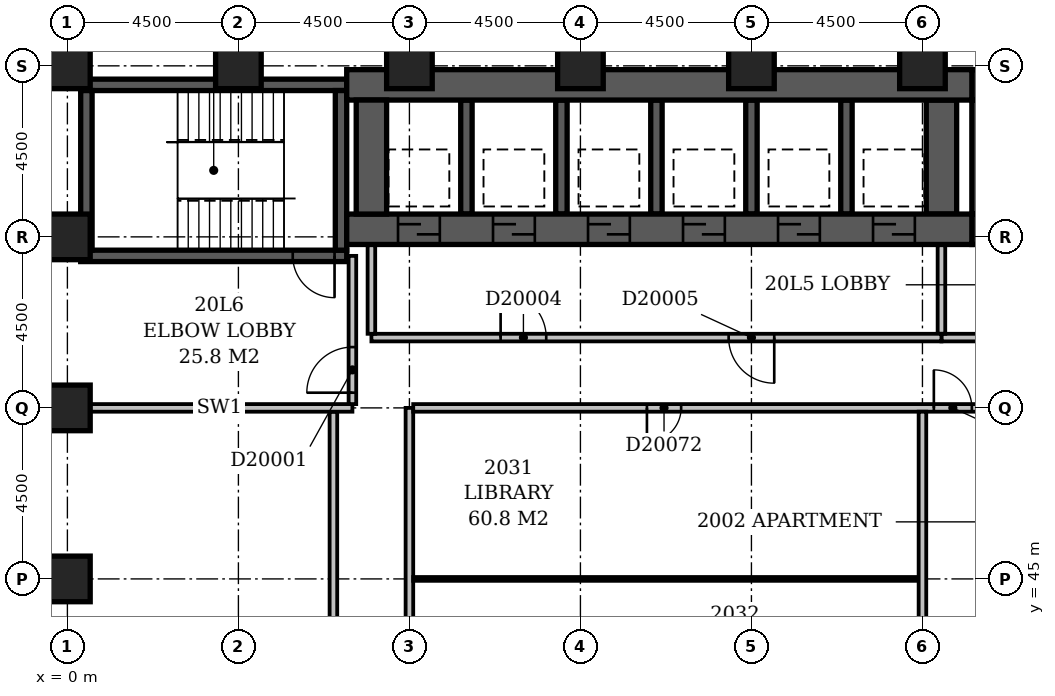
"""IFC4 building model, lengths in metres.
Left out: names, types, materials, properties, quantities, classifications, styles, units other than length and angle.
Written with IfcOpenShell. Run it as: python <this file> out.ifc"""

import sys

from ifc_helpers import new_model, si_unit, direction, frame, frame_2d, origin, origin_2d, place, context, subcontext, project, spatial, rectangle, extrude, element, fill, save


model = new_model("IFC4")
c1 = context("Model", 3, precision=1e-05, world=origin(), true_north=direction((0.0, 1.0)))
c2 = subcontext(c1, "Body", "Model", "MODEL_VIEW")
j1 = project(units=[si_unit("LENGTHUNIT", "METRE"), si_unit("PLANEANGLEUNIT", "RADIAN")], contexts=[c1])
p1 = place(None, origin())
s1 = spatial("IfcSite", under=j1, at=p1, CompositionType="ELEMENT")
p2 = place(p1, origin())
s2 = spatial("IfcBuilding", under=s1, at=p2, CompositionType="ELEMENT")
p3 = place(p2, frame((0.0, 0.0, 83.0)))
s3 = spatial("IfcBuildingStorey", under=s2, at=p3, CompositionType="ELEMENT", Elevation=83.0)
p4 = place(p3, frame((0.35, 53.5, -0.3), z_axis=(0.0, 0.0, 1.0), x_axis=(1.0, 0.0, 0.0)))
e1 = element("IfcWall", 1, at=p4, inside=s3, PredefinedType="SHEAR", context=c2, shape_type="SweptSolid", body=[
    extrude(rectangle(XDim=7.0, YDim=0.3, at=frame_2d((3.5, 0.0))), origin(), (0.0, 0.0, 1.0), 3.6),
])
p5 = place(p4, frame((5.58, 0.0, 0.3)))
e2 = element("IfcOpeningElement", 2, at=p5, cuts=e1, PredefinedType="OPENING", context=c2, shape_type="SweptSolid", body=[
    extrude(rectangle(XDim=1.1, YDim=2.1, at=frame_2d((0.55, 1.05))), frame((0.0, 0.162, 0.0), z_axis=(0.0, -1.0, 0.0), x_axis=(1.0, 0.0, 0.0)), (0.0, 0.0, 1.0), 0.324),
])
p6 = place(p3, frame((0.35, 58.0, -0.3), z_axis=(0.0, 0.0, 1.0), x_axis=(1.0, 0.0, 0.0)))
e3 = element("IfcWall", 3, at=p6, inside=s3, PredefinedType="SHEAR", context=c2, shape_type="SweptSolid", body=[
    extrude(rectangle(XDim=7.0, YDim=0.3, at=frame_2d((3.5, 0.0))), origin(), (0.0, 0.0, 1.0), 3.6),
])
for number, where, z_axis, x_axis in (
    (4, (0.5, 53.65, -0.3), (0.0, 0.0, 1.0), (0.0, 1.0, 0.0)),
    (5, (7.2, 53.65, -0.3), (0.0, 0.0, 1.0), (0.0, 1.0, 0.0)),
):
    element("IfcWall", number, at=place(p3, frame(where, z_axis=z_axis, x_axis=x_axis)), inside=s3, PredefinedType="SHEAR", context=c2, shape_type="SweptSolid", body=[
        extrude(rectangle(XDim=4.2, YDim=0.3, at=frame_2d((2.1, 0.0))), origin(), (0.0, 0.0, 1.0), 3.6),
    ])
p7 = place(p3, frame((7.35, 54.2, -0.3), z_axis=(0.0, 0.0, 1.0), x_axis=(1.0, 0.0, 0.0)))
e6 = element("IfcWall", 6, at=p7, inside=s3, PredefinedType="SHEAR", context=c2, shape_type="SweptSolid", body=[
    extrude(rectangle(XDim=16.45, YDim=0.8, at=frame_2d((8.225, 0.0))), origin(), (0.0, 0.0, 1.0), 3.6),
])
p8 = place(p7, frame((1.35, 0.0, 0.3)))
e7 = element("IfcOpeningElement", 7, at=p8, cuts=e6, PredefinedType="OPENING", context=c2, shape_type="SweptSolid", body=[
    extrude(rectangle(XDim=1.1, YDim=2.1, at=frame_2d((0.55, 1.05))), frame((0.0, 0.412, 0.0), z_axis=(0.0, -1.0, 0.0), x_axis=(1.0, 0.0, 0.0)), (0.0, 0.0, 1.0), 0.824),
])
p9 = place(p7, frame((3.85, 0.0, 0.3)))
e8 = element("IfcOpeningElement", 8, at=p9, cuts=e6, PredefinedType="OPENING", context=c2, shape_type="SweptSolid", body=[
    extrude(rectangle(XDim=1.1, YDim=2.1, at=frame_2d((0.55, 1.05))), frame((0.0, 0.412, 0.0), z_axis=(0.0, -1.0, 0.0), x_axis=(1.0, 0.0, 0.0)), (0.0, 0.0, 1.0), 0.824),
])
p10 = place(p7, frame((6.35, 0.0, 0.3)))
e9 = element("IfcOpeningElement", 9, at=p10, cuts=e6, PredefinedType="OPENING", context=c2, shape_type="SweptSolid", body=[
    extrude(rectangle(XDim=1.1, YDim=2.1, at=frame_2d((0.55, 1.05))), frame((0.0, 0.412, 0.0), z_axis=(0.0, -1.0, 0.0), x_axis=(1.0, 0.0, 0.0)), (0.0, 0.0, 1.0), 0.824),
])
p11 = place(p7, frame((8.85, 0.0, 0.3)))
e10 = element("IfcOpeningElement", 10, at=p11, cuts=e6, PredefinedType="OPENING", context=c2, shape_type="SweptSolid", body=[
    extrude(rectangle(XDim=1.1, YDim=2.1, at=frame_2d((0.55, 1.05))), frame((0.0, 0.412, 0.0), z_axis=(0.0, -1.0, 0.0), x_axis=(1.0, 0.0, 0.0)), (0.0, 0.0, 1.0), 0.824),
])
p12 = place(p7, frame((11.35, 0.0, 0.3)))
e11 = element("IfcOpeningElement", 11, at=p12, cuts=e6, PredefinedType="OPENING", context=c2, shape_type="SweptSolid", body=[
    extrude(rectangle(XDim=1.1, YDim=2.1, at=frame_2d((0.55, 1.05))), frame((0.0, 0.412, 0.0), z_axis=(0.0, -1.0, 0.0), x_axis=(1.0, 0.0, 0.0)), (0.0, 0.0, 1.0), 0.824),
])
p13 = place(p7, frame((13.85, 0.0, 0.3)))
e12 = element("IfcOpeningElement", 12, at=p13, cuts=e6, PredefinedType="OPENING", context=c2, shape_type="SweptSolid", body=[
    extrude(rectangle(XDim=1.1, YDim=2.1, at=frame_2d((0.55, 1.05))), frame((0.0, 0.412, 0.0), z_axis=(0.0, -1.0, 0.0), x_axis=(1.0, 0.0, 0.0)), (0.0, 0.0, 1.0), 0.824),
])
p14 = place(p3, frame((7.35, 58.0, -0.3), z_axis=(0.0, 0.0, 1.0), x_axis=(1.0, 0.0, 0.0)))
e13 = element("IfcWall", 13, at=p14, inside=s3, PredefinedType="SHEAR", context=c2, shape_type="SweptSolid", body=[
    extrude(rectangle(XDim=16.45, YDim=0.8, at=frame_2d((8.225, 0.0))), origin(), (0.0, 0.0, 1.0), 3.6),
])
p15 = place(p3, frame((8.0, 54.6, -0.3), z_axis=(0.0, 0.0, 1.0), x_axis=(0.0, 1.0, 0.0)))
e14 = element("IfcWall", 14, at=p15, inside=s3, PredefinedType="SHEAR", context=c2, shape_type="SweptSolid", body=[
    extrude(rectangle(XDim=3.0, YDim=0.8, at=frame_2d((1.5, 0.0))), origin(), (0.0, 0.0, 1.0), 3.6),
])
for number, where, z_axis, x_axis in (
    (15, (10.5, 54.6, -0.3), (0.0, 0.0, 1.0), (0.0, 1.0, 0.0)),
    (16, (13.0, 54.6, -0.3), (0.0, 0.0, 1.0), (0.0, 1.0, 0.0)),
    (17, (15.5, 54.6, -0.3), (0.0, 0.0, 1.0), (0.0, 1.0, 0.0)),
    (18, (18.0, 54.6, -0.3), (0.0, 0.0, 1.0), (0.0, 1.0, 0.0)),
    (19, (20.5, 54.6, -0.3), (0.0, 0.0, 1.0), (0.0, 1.0, 0.0)),
):
    element("IfcWall", number, at=place(p3, frame(where, z_axis=z_axis, x_axis=x_axis)), inside=s3, PredefinedType="SHEAR", context=c2, shape_type="SweptSolid", body=[
        extrude(rectangle(XDim=3.0, YDim=0.3, at=frame_2d((1.5, 0.0))), origin(), (0.0, 0.0, 1.0), 3.6),
    ])
p16 = place(p3, frame((23.0, 54.6, -0.3), z_axis=(0.0, 0.0, 1.0), x_axis=(0.0, 1.0, 0.0)))
e20 = element("IfcWall", 20, at=p16, inside=s3, PredefinedType="SHEAR", context=c2, shape_type="SweptSolid", body=[
    extrude(rectangle(XDim=3.0, YDim=0.8, at=frame_2d((1.5, 0.0))), origin(), (0.0, 0.0, 1.0), 3.6),
])
p17 = place(p3, frame((23.8, 54.2, -0.3), z_axis=(0.0, 0.0, 1.0), x_axis=(1.0, 0.0, 0.0)))
e21 = element("IfcWall", 21, at=p17, inside=s3, PredefinedType="SHEAR", context=c2, shape_type="SweptSolid", body=[
    extrude(rectangle(XDim=3.3, YDim=0.8, at=frame_2d((1.65, 0.0))), origin(), (0.0, 0.0, 1.0), 3.6),
])
p18 = place(p17, frame((1.1, 0.0, 0.3)))
e22 = element("IfcOpeningElement", 22, at=p18, cuts=e21, PredefinedType="OPENING", context=c2, shape_type="SweptSolid", body=[
    extrude(rectangle(XDim=1.1, YDim=2.1, at=frame_2d((0.55, 1.05))), frame((0.0, 0.412, 0.0), z_axis=(0.0, -1.0, 0.0), x_axis=(1.0, 0.0, 0.0)), (0.0, 0.0, 1.0), 0.824),
])
p19 = place(p3, frame((23.8, 58.0, -0.3), z_axis=(0.0, 0.0, 1.0), x_axis=(1.0, 0.0, 0.0)))
e23 = element("IfcWall", 23, at=p19, inside=s3, PredefinedType="SHEAR", context=c2, shape_type="SweptSolid", body=[
    extrude(rectangle(XDim=3.3, YDim=0.8, at=frame_2d((1.65, 0.0))), origin(), (0.0, 0.0, 1.0), 3.6),
])
p20 = place(p3, frame((24.2, 54.6, -0.3), z_axis=(0.0, 0.0, 1.0), x_axis=(0.0, 1.0, 0.0)))
e24 = element("IfcWall", 24, at=p20, inside=s3, PredefinedType="SHEAR", context=c2, shape_type="SweptSolid", body=[
    extrude(rectangle(XDim=3.0, YDim=0.8, at=frame_2d((1.5, 0.0))), origin(), (0.0, 0.0, 1.0), 3.6),
])
for number, where, z_axis, x_axis in (
    (25, (0.0, 45.0, -0.3), (0.0, 0.0, 1.0), (1.0, 0.0, 0.0)),
    (26, (0.0, 49.5, -0.3), (0.0, 0.0, 1.0), (1.0, 0.0, 0.0)),
    (27, (0.0, 54.0, -0.3), (0.0, 0.0, 1.0), (1.0, 0.0, 0.0)),
    (28, (0.0, 58.5, -0.3), (0.0, 0.0, 1.0), (1.0, 0.0, 0.0)),
    (29, (4.5, 58.5, -0.3), (0.0, 0.0, 1.0), (1.0, 0.0, 0.0)),
    (30, (9.0, 58.5, -0.3), (0.0, 0.0, 1.0), (1.0, 0.0, 0.0)),
    (31, (13.5, 58.5, -0.3), (0.0, 0.0, 1.0), (1.0, 0.0, 0.0)),
    (32, (18.0, 58.5, -0.3), (0.0, 0.0, 1.0), (1.0, 0.0, 0.0)),
    (33, (22.5, 58.5, -0.3), (0.0, 0.0, 1.0), (1.0, 0.0, 0.0)),
):
    element("IfcColumn", number, at=place(p3, frame(where, z_axis=z_axis, x_axis=x_axis)), inside=s3, PredefinedType="COLUMN", context=c2, shape_type="SweptSolid", body=[
        extrude(rectangle(XDim=1.2, YDim=1.2, at=origin_2d()), origin(), (0.0, 0.0, 1.0), 3.6),
    ])
p21 = place(p3, frame((8.0, 51.35, 0.0), z_axis=(0.0, 0.0, 1.0), x_axis=(1.0, 0.0, 0.0)))
e34 = element("IfcWall", 34, at=p21, inside=s3, PredefinedType="PARTITIONING", context=c2, shape_type="SweptSolid", body=[
    extrude(rectangle(XDim=15.0, YDim=0.2, at=frame_2d((7.5, 0.0))), origin(), (0.0, 0.0, 1.0), 3.3),
])
p22 = place(p21, frame((3.4, 0.0, 0.0)))
e35 = element("IfcOpeningElement", 35, at=p22, cuts=e34, PredefinedType="OPENING", context=c2, shape_type="SweptSolid", body=[
    extrude(rectangle(XDim=1.2, YDim=2.1, at=frame_2d((0.6, 1.05))), frame((0.0, 0.112, 0.0), z_axis=(0.0, -1.0, 0.0), x_axis=(1.0, 0.0, 0.0)), (0.0, 0.0, 1.0), 0.224),
])
p23 = place(p21, frame((9.4, 0.0, 0.0)))
e36 = element("IfcOpeningElement", 36, at=p23, cuts=e34, PredefinedType="OPENING", context=c2, shape_type="SweptSolid", body=[
    extrude(rectangle(XDim=1.2, YDim=2.1, at=frame_2d((0.6, 1.05))), frame((0.0, 0.112, 0.0), z_axis=(0.0, -1.0, 0.0), x_axis=(1.0, 0.0, 0.0)), (0.0, 0.0, 1.0), 0.224),
])
for number, where, z_axis, x_axis in (
    (37, (23.0, 51.45, 0.0), (0.0, 0.0, 1.0), (0.0, 1.0, 0.0)),
    (38, (8.0, 51.45, 0.0), (0.0, 0.0, 1.0), (0.0, 1.0, 0.0)),
):
    element("IfcWall", number, at=place(p3, frame(where, z_axis=z_axis, x_axis=x_axis)), inside=s3, PredefinedType="PARTITIONING", context=c2, shape_type="SweptSolid", body=[
        extrude(rectangle(XDim=2.33, YDim=0.2, at=frame_2d((1.165, 0.0))), origin(), (0.0, 0.0, 1.0), 3.3),
    ])
p24 = place(p3, frame((23.0, 51.35, 0.0), z_axis=(0.0, 0.0, 1.0), x_axis=(1.0, 0.0, 0.0)))
e39 = element("IfcWall", 39, at=p24, inside=s3, PredefinedType="PARTITIONING", context=c2, shape_type="SweptSolid", body=[
    extrude(rectangle(XDim=4.8, YDim=0.2, at=frame_2d((2.4, 0.0))), origin(), (0.0, 0.0, 1.0), 3.3),
])
p25 = place(p24, frame((1.65, 0.0, 0.0)))
e40 = element("IfcOpeningElement", 40, at=p25, cuts=e39, PredefinedType="OPENING", context=c2, shape_type="SweptSolid", body=[
    extrude(rectangle(XDim=1.2, YDim=2.1, at=frame_2d((0.6, 1.05))), frame((0.0, 0.112, 0.0), z_axis=(0.0, -1.0, 0.0), x_axis=(1.0, 0.0, 0.0)), (0.0, 0.0, 1.0), 0.224),
])
p26 = place(p3, frame((0.5, 49.5, 0.0), z_axis=(0.0, 0.0, 1.0), x_axis=(1.0, 0.0, 0.0)))
e41 = element("IfcWall", 41, at=p26, inside=s3, PredefinedType="PARTITIONING", context=c2, shape_type="SweptSolid", body=[
    extrude(rectangle(XDim=7.0, YDim=0.2, at=frame_2d((3.5, 0.0))), origin(), (0.0, 0.0, 1.0), 3.3),
])
p27 = place(p3, frame((7.5, 49.6, 0.0), z_axis=(0.0, 0.0, 1.0), x_axis=(0.0, 1.0, 0.0)))
e42 = element("IfcWall", 42, at=p27, inside=s3, PredefinedType="PARTITIONING", context=c2, shape_type="SweptSolid", body=[
    extrude(rectangle(XDim=3.9, YDim=0.2, at=frame_2d((1.95, 0.0))), origin(), (0.0, 0.0, 1.0), 3.3),
])
p28 = place(p27, frame((0.3, 0.0, 0.0)))
e43 = element("IfcOpeningElement", 43, at=p28, cuts=e42, PredefinedType="OPENING", context=c2, shape_type="SweptSolid", body=[
    extrude(rectangle(XDim=1.2, YDim=2.1, at=frame_2d((0.6, 1.05))), frame((0.0, 0.112, 0.0), z_axis=(0.0, -1.0, 0.0), x_axis=(1.0, 0.0, 0.0)), (0.0, 0.0, 1.0), 0.224),
])
p29 = place(p3, frame((9.0, 5.0, 0.0), z_axis=(0.0, 0.0, 1.0), x_axis=(0.0, 1.0, 0.0)))
e44 = element("IfcWall", 44, at=p29, inside=s3, PredefinedType="PARTITIONING", context=c2, shape_type="SweptSolid", body=[
    extrude(rectangle(XDim=44.5, YDim=0.2, at=frame_2d((22.25, 0.0))), origin(), (0.0, 0.0, 1.0), 3.3),
])
p30 = place(p29, frame((28.45, 0.0, 0.0)))
e45 = element("IfcOpeningElement", 45, at=p30, cuts=e44, PredefinedType="OPENING", context=c2, shape_type="SweptSolid", body=[
    extrude(rectangle(XDim=1.0, YDim=2.1, at=frame_2d((0.5, 1.05))), frame((0.0, 0.112, 0.0), z_axis=(0.0, -1.0, 0.0), x_axis=(1.0, 0.0, 0.0)), (0.0, 0.0, 1.0), 0.224),
])
p31 = place(p29, frame((22.8, 0.0, 0.0)))
e46 = element("IfcOpeningElement", 46, at=p31, cuts=e44, PredefinedType="OPENING", context=c2, shape_type="SweptSolid", body=[
    extrude(rectangle(XDim=1.0, YDim=2.1, at=frame_2d((0.5, 1.05))), frame((0.0, 0.112, 0.0), z_axis=(0.0, -1.0, 0.0), x_axis=(1.0, 0.0, 0.0)), (0.0, 0.0, 1.0), 0.224),
])
p32 = place(p29, frame((14.55, 0.0, 0.0)))
e47 = element("IfcOpeningElement", 47, at=p32, cuts=e44, PredefinedType="OPENING", context=c2, shape_type="SweptSolid", body=[
    extrude(rectangle(XDim=1.0, YDim=2.1, at=frame_2d((0.5, 1.05))), frame((0.0, 0.112, 0.0), z_axis=(0.0, -1.0, 0.0), x_axis=(1.0, 0.0, 0.0)), (0.0, 0.0, 1.0), 0.224),
])
p33 = place(p29, frame((9.3, 0.0, 0.0)))
e48 = element("IfcOpeningElement", 48, at=p33, cuts=e44, PredefinedType="OPENING", context=c2, shape_type="SweptSolid", body=[
    extrude(rectangle(XDim=1.0, YDim=2.1, at=frame_2d((0.5, 1.05))), frame((0.0, 0.112, 0.0), z_axis=(0.0, -1.0, 0.0), x_axis=(1.0, 0.0, 0.0)), (0.0, 0.0, 1.0), 0.224),
])
p34 = place(p29, frame((35.0, 0.0, 0.0)))
e49 = element("IfcOpeningElement", 49, at=p34, cuts=e44, PredefinedType="OPENING", context=c2, shape_type="SweptSolid", body=[
    extrude(rectangle(XDim=0.9, YDim=2.1, at=frame_2d((0.45, 1.05))), frame((0.0, 0.112, 0.0), z_axis=(0.0, -1.0, 0.0), x_axis=(1.0, 0.0, 0.0)), (0.0, 0.0, 1.0), 0.224),
])
p35 = place(p29, frame((1.5, 0.0, 0.0)))
e50 = element("IfcOpeningElement", 50, at=p35, cuts=e44, PredefinedType="OPENING", context=c2, shape_type="SweptSolid", body=[
    extrude(rectangle(XDim=0.9, YDim=2.1, at=frame_2d((0.45, 1.05))), frame((0.0, 0.112, 0.0), z_axis=(0.0, -1.0, 0.0), x_axis=(1.0, 0.0, 0.0)), (0.0, 0.0, 1.0), 0.224),
])
p36 = place(p3, frame((7.0, 34.6, 0.0), z_axis=(0.0, 0.0, 1.0), x_axis=(0.0, 1.0, 0.0)))
e51 = element("IfcWall", 51, at=p36, inside=s3, PredefinedType="PARTITIONING", context=c2, shape_type="SweptSolid", body=[
    extrude(rectangle(XDim=14.8, YDim=0.2, at=frame_2d((7.4, 0.0))), origin(), (0.0, 0.0, 1.0), 3.3),
])
p37 = place(p36, frame((6.95, 0.0, 0.0)))
e52 = element("IfcOpeningElement", 52, at=p37, cuts=e51, PredefinedType="OPENING", context=c2, shape_type="SweptSolid", body=[
    extrude(rectangle(XDim=0.9, YDim=2.1, at=frame_2d((0.45, 1.05))), frame((0.0, 0.112, 0.0), z_axis=(0.0, -1.0, 0.0), x_axis=(1.0, 0.0, 0.0)), (0.0, 0.0, 1.0), 0.224),
])
p38 = place(p3, frame((22.5, 36.6, 0.0), z_axis=(0.0, 0.0, 1.0), x_axis=(0.0, 1.0, 0.0)))
e53 = element("IfcWall", 53, at=p38, inside=s3, PredefinedType="PARTITIONING", context=c2, shape_type="SweptSolid", body=[
    extrude(rectangle(XDim=12.8, YDim=0.2, at=frame_2d((6.4, 0.0))), origin(), (0.0, 0.0, 1.0), 3.3),
])
p39 = place(p3, frame((9.1, 45.0, 0.0), z_axis=(0.0, 0.0, 1.0), x_axis=(1.0, 0.0, 0.0)))
e54 = element("IfcWall", 54, at=p39, inside=s3, PredefinedType="PARTITIONING", context=c2, shape_type="SweptSolid", body=[
    extrude(rectangle(XDim=13.3, YDim=0.1, at=frame_2d((6.65, 0.0))), origin(), (0.0, 0.0, 1.0), 3.3),
])
p40 = place(p3, frame((9.1, 49.5, 0.0), z_axis=(0.0, 0.0, 1.0), x_axis=(1.0, 0.0, 0.0)))
e55 = element("IfcWall", 55, at=p40, inside=s3, PredefinedType="PARTITIONING", context=c2, shape_type="SweptSolid", body=[
    extrude(rectangle(XDim=57.8, YDim=0.2, at=frame_2d((28.9, 0.0))), origin(), (0.0, 0.0, 1.0), 3.3),
])
p41 = place(p40, frame((13.7, 0.0, 0.0)))
e56 = element("IfcOpeningElement", 56, at=p41, cuts=e55, PredefinedType="OPENING", context=c2, shape_type="SweptSolid", body=[
    extrude(rectangle(XDim=1.0, YDim=2.1, at=frame_2d((0.5, 1.05))), frame((0.0, 0.112, 0.0), z_axis=(0.0, -1.0, 0.0), x_axis=(1.0, 0.0, 0.0)), (0.0, 0.0, 1.0), 0.224),
])
p42 = place(p40, frame((22.7, 0.0, 0.0)))
e57 = element("IfcOpeningElement", 57, at=p42, cuts=e55, PredefinedType="OPENING", context=c2, shape_type="SweptSolid", body=[
    extrude(rectangle(XDim=1.0, YDim=2.1, at=frame_2d((0.5, 1.05))), frame((0.0, 0.112, 0.0), z_axis=(0.0, -1.0, 0.0), x_axis=(1.0, 0.0, 0.0)), (0.0, 0.0, 1.0), 0.224),
])
p43 = place(p40, frame((38.6, 0.0, 0.0)))
e58 = element("IfcOpeningElement", 58, at=p43, cuts=e55, PredefinedType="OPENING", context=c2, shape_type="SweptSolid", body=[
    extrude(rectangle(XDim=1.0, YDim=2.1, at=frame_2d((0.5, 1.05))), frame((0.0, 0.112, 0.0), z_axis=(0.0, -1.0, 0.0), x_axis=(1.0, 0.0, 0.0)), (0.0, 0.0, 1.0), 0.224),
])
p44 = place(p40, frame((55.45, 0.0, 0.0)))
e59 = element("IfcOpeningElement", 59, at=p44, cuts=e55, PredefinedType="OPENING", context=c2, shape_type="SweptSolid", body=[
    extrude(rectangle(XDim=1.0, YDim=2.1, at=frame_2d((0.5, 1.05))), frame((0.0, 0.112, 0.0), z_axis=(0.0, -1.0, 0.0), x_axis=(1.0, 0.0, 0.0)), (0.0, 0.0, 1.0), 0.224),
])
p45 = place(p40, frame((6.15, 0.0, 0.0)))
e60 = element("IfcOpeningElement", 60, at=p45, cuts=e55, PredefinedType="OPENING", context=c2, shape_type="SweptSolid", body=[
    extrude(rectangle(XDim=0.9, YDim=2.1, at=frame_2d((0.45, 1.05))), frame((0.0, 0.112, 0.0), z_axis=(0.0, -1.0, 0.0), x_axis=(1.0, 0.0, 0.0)), (0.0, 0.0, 1.0), 0.224),
])
p46 = place(p28, origin())
e61 = element("IfcDoor", 61, at=p46, inside=s3, OperationType="SINGLE_SWING_LEFT", PredefinedType="DOOR", context=c2, shape_type="SweptSolid", body=[
    extrude(rectangle(XDim=1.2, YDim=2.1, at=frame_2d((0.6, 1.05))), frame((0.0, 0.025, 0.0), z_axis=(0.0, -1.0, 0.0), x_axis=(1.0, 0.0, 0.0)), (0.0, 0.0, 1.0), 0.05),
])
fill(e43, e61)
p47 = place(p8, origin())
e62 = element("IfcDoor", 62, at=p47, inside=s3, OperationType="SLIDING_TO_LEFT", PredefinedType="DOOR", context=c2, shape_type="SweptSolid", body=[
    extrude(rectangle(XDim=1.1, YDim=2.1, at=frame_2d((0.55, 1.05))), frame((0.0, 0.025, 0.0), z_axis=(0.0, -1.0, 0.0), x_axis=(1.0, 0.0, 0.0)), (0.0, 0.0, 1.0), 0.05),
])
fill(e7, e62)
p48 = place(p9, origin())
e63 = element("IfcDoor", 63, at=p48, inside=s3, OperationType="SLIDING_TO_LEFT", PredefinedType="DOOR", context=c2, shape_type="SweptSolid", body=[
    extrude(rectangle(XDim=1.1, YDim=2.1, at=frame_2d((0.55, 1.05))), frame((0.0, 0.025, 0.0), z_axis=(0.0, -1.0, 0.0), x_axis=(1.0, 0.0, 0.0)), (0.0, 0.0, 1.0), 0.05),
])
fill(e8, e63)
p49 = place(p10, origin())
e64 = element("IfcDoor", 64, at=p49, inside=s3, OperationType="SLIDING_TO_LEFT", PredefinedType="DOOR", context=c2, shape_type="SweptSolid", body=[
    extrude(rectangle(XDim=1.1, YDim=2.1, at=frame_2d((0.55, 1.05))), frame((0.0, 0.025, 0.0), z_axis=(0.0, -1.0, 0.0), x_axis=(1.0, 0.0, 0.0)), (0.0, 0.0, 1.0), 0.05),
])
fill(e9, e64)
p50 = place(p11, origin())
e65 = element("IfcDoor", 65, at=p50, inside=s3, OperationType="SLIDING_TO_LEFT", PredefinedType="DOOR", context=c2, shape_type="SweptSolid", body=[
    extrude(rectangle(XDim=1.1, YDim=2.1, at=frame_2d((0.55, 1.05))), frame((0.0, 0.025, 0.0), z_axis=(0.0, -1.0, 0.0), x_axis=(1.0, 0.0, 0.0)), (0.0, 0.0, 1.0), 0.05),
])
fill(e10, e65)
p51 = place(p12, origin())
e66 = element("IfcDoor", 66, at=p51, inside=s3, OperationType="SLIDING_TO_LEFT", PredefinedType="DOOR", context=c2, shape_type="SweptSolid", body=[
    extrude(rectangle(XDim=1.1, YDim=2.1, at=frame_2d((0.55, 1.05))), frame((0.0, 0.025, 0.0), z_axis=(0.0, -1.0, 0.0), x_axis=(1.0, 0.0, 0.0)), (0.0, 0.0, 1.0), 0.05),
])
fill(e11, e66)
p52 = place(p13, origin())
e67 = element("IfcDoor", 67, at=p52, inside=s3, OperationType="SLIDING_TO_LEFT", PredefinedType="DOOR", context=c2, shape_type="SweptSolid", body=[
    extrude(rectangle(XDim=1.1, YDim=2.1, at=frame_2d((0.55, 1.05))), frame((0.0, 0.025, 0.0), z_axis=(0.0, -1.0, 0.0), x_axis=(1.0, 0.0, 0.0)), (0.0, 0.0, 1.0), 0.05),
])
fill(e12, e67)
p53 = place(p22, origin())
e68 = element("IfcDoor", 68, at=p53, inside=s3, OperationType="SINGLE_SWING_LEFT", PredefinedType="DOOR", context=c2, shape_type="SweptSolid", body=[
    extrude(rectangle(XDim=1.2, YDim=2.1, at=frame_2d((0.6, 1.05))), frame((0.0, 0.025, 0.0), z_axis=(0.0, -1.0, 0.0), x_axis=(1.0, 0.0, 0.0)), (0.0, 0.0, 1.0), 0.05),
])
fill(e35, e68)
p54 = place(p23, origin())
e69 = element("IfcDoor", 69, at=p54, inside=s3, OperationType="SINGLE_SWING_RIGHT", PredefinedType="DOOR", context=c2, shape_type="SweptSolid", body=[
    extrude(rectangle(XDim=1.2, YDim=2.1, at=frame_2d((0.6, 1.05))), frame((0.0, 0.025, 0.0), z_axis=(0.0, -1.0, 0.0), x_axis=(1.0, 0.0, 0.0)), (0.0, 0.0, 1.0), 0.05),
])
fill(e36, e69)
p55 = place(p5, origin())
e70 = element("IfcDoor", 70, at=p55, inside=s3, OperationType="SINGLE_SWING_RIGHT", PredefinedType="DOOR", context=c2, shape_type="SweptSolid", body=[
    extrude(rectangle(XDim=1.1, YDim=2.1, at=frame_2d((0.55, 1.05))), frame((0.0, 0.025, 0.0), z_axis=(0.0, -1.0, 0.0), x_axis=(1.0, 0.0, 0.0)), (0.0, 0.0, 1.0), 0.05),
])
fill(e2, e70)
p56 = place(p41, origin())
e71 = element("IfcDoor", 71, at=p56, inside=s3, OperationType="SINGLE_SWING_LEFT", PredefinedType="DOOR", context=c2, shape_type="SweptSolid", body=[
    extrude(rectangle(XDim=1.0, YDim=2.1, at=frame_2d((0.5, 1.05))), frame((0.0, 0.025, 0.0), z_axis=(0.0, -1.0, 0.0), x_axis=(1.0, 0.0, 0.0)), (0.0, 0.0, 1.0), 0.05),
])
fill(e56, e71)
p57 = place(p45, frame((0.9, 0.0, 0.0), z_axis=(0.0, 0.0, 1.0), x_axis=(-1.0, 0.0, 0.0)))
e72 = element("IfcDoor", 72, at=p57, inside=s3, OperationType="SINGLE_SWING_RIGHT", PredefinedType="DOOR", context=c2, shape_type="SweptSolid", body=[
    extrude(rectangle(XDim=0.9, YDim=2.1, at=frame_2d((0.45, 1.05))), frame((0.0, 0.025, 0.0), z_axis=(0.0, -1.0, 0.0), x_axis=(1.0, 0.0, 0.0)), (0.0, 0.0, 1.0), 0.05),
])
fill(e60, e72)
save(model, sys.argv[1])
